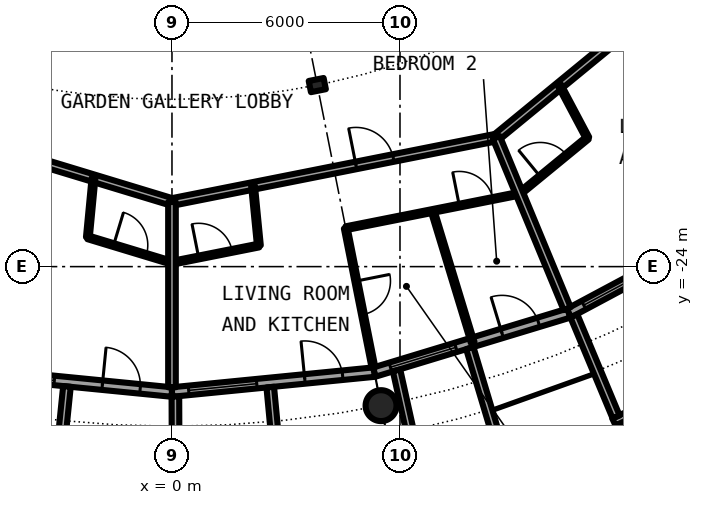
"""IFC4 building model, lengths in metres.
Left out: names, types, materials, properties, quantities, classifications, styles, units other than length and angle.
Written with IfcOpenShell. Run it as: python <this file> out.ifc"""

import sys

from ifc_helpers import new_model, si_unit, direction, frame, frame_2d, origin, origin_2d, place, context, subcontext, project, spatial, rectangle, circle, hollow_circle, i_section, extrude, element, fill, save


model = new_model("IFC4")
c1 = context("Model", 3, precision=1e-05, world=origin(), true_north=direction((0.0, 1.0)))
c2 = subcontext(c1, "Body", "Model", "MODEL_VIEW")
j1 = project(units=[si_unit("LENGTHUNIT", "METRE"), si_unit("PLANEANGLEUNIT", "RADIAN")], contexts=[c1])
p1 = place(None, origin())
s1 = spatial("IfcSite", under=j1, at=p1, CompositionType="ELEMENT")
p2 = place(p1, origin())
s2 = spatial("IfcBuilding", under=s1, at=p2, CompositionType="ELEMENT")
p3 = place(p2, frame((0.0, 0.0, 199.35)))
s3 = spatial("IfcBuildingStorey", under=s2, at=p3, CompositionType="ELEMENT", Elevation=199.35)
p4 = place(p3, frame((5.501, -27.658, 0.0), z_axis=(0.0, 0.0, 1.0), x_axis=(1.0, 0.0, 0.0)))
e1 = element("IfcColumn", 1, at=p4, inside=s3, PredefinedType="COLUMN", context=c2, shape_type="SweptSolid", body=[
    extrude(hollow_circle(Radius=0.406, WallThickness=0.03, at=origin_2d()), origin(), (0.0, 0.0, 1.0), 3.05),
])
p5 = place(p3, frame((3.824, -19.223, 0.0), z_axis=(0.0, 0.0, 1.0), x_axis=(0.195090322016, -0.980785280403, 0.0)))
e2 = element("IfcColumn", 2, at=p5, inside=s3, PredefinedType="COLUMN", context=c2, shape_type="SweptSolid", body=[
    extrude(i_section(OverallWidth=0.3, OverallDepth=0.4, WebThickness=0.013, FlangeThickness=0.024, FilletRadius=0.027, at=origin_2d()), origin(), (0.0, 0.0, 1.0), 3.05),
])
p6 = place(p3, frame((-5.326, -26.775, 0.0), z_axis=(0.0, 0.0, 1.0), x_axis=(0.995173996315, -0.098126026407, 0.0)))
e3 = element("IfcWall", 3, at=p6, inside=s3, PredefinedType="SOLIDWALL", context=c2, shape_type="SweptSolid", body=[
    extrude(rectangle(XDim=5.352, YDim=0.25, at=frame_2d((2.676, 0.0))), origin(), (0.0, 0.0, 1.0), 2.7),
])
p7 = place(p6, frame((0.441, 0.0, 0.3)))
e4 = element("IfcOpeningElement", 4, at=p7, cuts=e3, PredefinedType="OPENING", context=c2, shape_type="SweptSolid", body=[
    extrude(rectangle(XDim=1.8, YDim=2.1, at=frame_2d((0.9, 1.05))), frame((0.0, 0.135, 0.0), z_axis=(0.0, -1.0, 0.0), x_axis=(1.0, 0.0, 0.0)), (0.0, 0.0, 1.0), 0.27),
])
p8 = place(p6, frame((3.51, 0.0, 0.0)))
e5 = element("IfcOpeningElement", 5, at=p8, cuts=e3, PredefinedType="OPENING", context=c2, shape_type="SweptSolid", body=[
    extrude(rectangle(XDim=1.0, YDim=2.2, at=frame_2d((0.5, 1.1))), frame((0.0, 0.135, 0.0), z_axis=(0.0, -1.0, 0.0), x_axis=(1.0, 0.0, 0.0)), (0.0, 0.0, 1.0), 0.27),
])
p9 = place(p3, frame((-2.764, -27.153, -0.03), z_axis=(0.0, 0.0, 1.0), x_axis=(-0.101505487237, -0.994834979311, 0.0)))
e6 = element("IfcWall", 6, at=p9, inside=s3, PredefinedType="SOLIDWALL", context=c2, shape_type="SweptSolid", body=[
    extrude(rectangle(XDim=3.007, YDim=0.2, at=frame_2d((1.503, 0.0))), origin(), (0.0, 0.0, 1.0), 2.73),
])
p10 = place(p3, frame((0.0, -27.3, 0.0), z_axis=(0.0, 0.0, 1.0), x_axis=(0.995173996315, 0.098126026407, 0.0)))
e7 = element("IfcWall", 7, at=p10, inside=s3, PredefinedType="SOLIDWALL", context=c2, shape_type="SweptSolid", body=[
    extrude(rectangle(XDim=5.352, YDim=0.25, at=frame_2d((2.676, 0.0))), origin(), (0.0, 0.0, 1.0), 2.7),
])
p11 = place(p10, frame((0.441, 0.0, 0.3)))
e8 = element("IfcOpeningElement", 8, at=p11, cuts=e7, PredefinedType="OPENING", context=c2, shape_type="SweptSolid", body=[
    extrude(rectangle(XDim=1.8, YDim=2.1, at=frame_2d((0.9, 1.05))), frame((0.0, 0.135, 0.0), z_axis=(0.0, -1.0, 0.0), x_axis=(1.0, 0.0, 0.0)), (0.0, 0.0, 1.0), 0.27),
])
p12 = place(p10, frame((3.51, 0.0, 0.0)))
e9 = element("IfcOpeningElement", 9, at=p12, cuts=e7, PredefinedType="OPENING", context=c2, shape_type="SweptSolid", body=[
    extrude(rectangle(XDim=1.0, YDim=2.2, at=frame_2d((0.5, 1.1))), frame((0.0, 0.135, 0.0), z_axis=(0.0, -1.0, 0.0), x_axis=(1.0, 0.0, 0.0)), (0.0, 0.0, 1.0), 0.27),
])
p13 = place(p3, frame((0.09, -27.417, -0.03), z_axis=(0.0, 0.0, 1.0), x_axis=(0.00347308367, -0.999993968827, 0.0)))
e10 = element("IfcWall", 10, at=p13, inside=s3, PredefinedType="SOLIDWALL", context=c2, shape_type="SweptSolid", body=[
    extrude(rectangle(XDim=2.882, YDim=0.2, at=frame_2d((1.441, 0.0))), origin(), (0.0, 0.0, 1.0), 2.73),
])
p14 = place(p3, frame((2.586, -27.171, -0.03), z_axis=(0.0, 0.0, 1.0), x_axis=(0.094548432284, -0.995520262954, 0.0)))
e11 = element("IfcWall", 11, at=p14, inside=s3, PredefinedType="SOLIDWALL", context=c2, shape_type="SweptSolid", body=[
    extrude(rectangle(XDim=3.006, YDim=0.2, at=frame_2d((1.503, 0.0))), origin(), (0.0, 0.0, 1.0), 2.73),
])
p15 = place(p3, frame((5.326, -26.775, 0.0), z_axis=(0.0, 0.0, 1.0), x_axis=(0.956965678721, 0.290201119486, 0.0)))
e12 = element("IfcWall", 12, at=p15, inside=s3, PredefinedType="SOLIDWALL", context=c2, shape_type="SweptSolid", body=[
    extrude(rectangle(XDim=5.351, YDim=0.25, at=frame_2d((2.676, 0.0))), origin(), (0.0, 0.0, 1.0), 2.7),
])
p16 = place(p15, frame((0.441, 0.0, 0.3)))
e13 = element("IfcOpeningElement", 13, at=p16, cuts=e12, PredefinedType="OPENING", context=c2, shape_type="SweptSolid", body=[
    extrude(rectangle(XDim=1.8, YDim=2.1, at=frame_2d((0.9, 1.05))), frame((0.0, 0.135, 0.0), z_axis=(0.0, -1.0, 0.0), x_axis=(1.0, 0.0, 0.0)), (0.0, 0.0, 1.0), 0.27),
])
p17 = place(p15, frame((3.51, 0.0, 0.0)))
e14 = element("IfcOpeningElement", 14, at=p17, cuts=e12, PredefinedType="OPENING", context=c2, shape_type="SweptSolid", body=[
    extrude(rectangle(XDim=1.0, YDim=2.2, at=frame_2d((0.5, 1.1))), frame((0.0, 0.135, 0.0), z_axis=(0.0, -1.0, 0.0), x_axis=(1.0, 0.0, 0.0)), (0.0, 0.0, 1.0), 0.27),
])
p18 = place(p3, frame((5.909, -26.729, -0.03), z_axis=(0.0, 0.0, 1.0), x_axis=(0.216409053917, -0.976302781612, 0.0)))
e15 = element("IfcWall", 15, at=p18, inside=s3, PredefinedType="SOLIDWALL", context=c2, shape_type="SweptSolid", body=[
    extrude(rectangle(XDim=2.925, YDim=0.2, at=frame_2d((1.463, 0.0))), origin(), (0.0, 0.0, 1.0), 2.73),
])
p19 = place(p3, frame((7.837, -26.144, -0.03), z_axis=(0.0, 0.0, 1.0), x_axis=(0.287064767992, -0.957911174889, 0.0)))
e16 = element("IfcWall", 16, at=p19, inside=s3, PredefinedType="SOLIDWALL", context=c2, shape_type="SweptSolid", body=[
    extrude(rectangle(XDim=3.006, YDim=0.2, at=frame_2d((1.503, 0.0))), origin(), (0.0, 0.0, 1.0), 2.73),
])
p20 = place(p3, frame((10.447, -25.222, 0.0), z_axis=(0.0, 0.0, 1.0), x_axis=(0.881915646801, 0.471407246368, 0.0)))
e17 = element("IfcWall", 17, at=p20, inside=s3, PredefinedType="SOLIDWALL", context=c2, shape_type="SweptSolid", body=[
    extrude(rectangle(XDim=5.352, YDim=0.25, at=frame_2d((2.676, 0.0))), origin(), (0.0, 0.0, 1.0), 2.7),
])
p21 = place(p20, frame((0.441, 0.0, 0.3)))
e18 = element("IfcOpeningElement", 18, at=p21, cuts=e17, PredefinedType="OPENING", context=c2, shape_type="SweptSolid", body=[
    extrude(rectangle(XDim=1.8, YDim=2.1, at=frame_2d((0.9, 1.05))), frame((0.0, 0.135, 0.0), z_axis=(0.0, -1.0, 0.0), x_axis=(1.0, 0.0, 0.0)), (0.0, 0.0, 1.0), 0.27),
])
p22 = place(p20, frame((3.51, 0.0, 0.0)))
e19 = element("IfcOpeningElement", 19, at=p22, cuts=e17, PredefinedType="OPENING", context=c2, shape_type="SweptSolid", body=[
    extrude(rectangle(XDim=1.0, YDim=2.2, at=frame_2d((0.5, 1.1))), frame((0.0, 0.135, 0.0), z_axis=(0.0, -1.0, 0.0), x_axis=(1.0, 0.0, 0.0)), (0.0, 0.0, 1.0), 0.27),
])
p23 = place(p3, frame((11.629, -28.088, -0.03), z_axis=(0.0, 0.0, 1.0), x_axis=(0.904000060331, 0.427532327342, 0.0)))
e20 = element("IfcWall", 20, at=p23, inside=s3, PredefinedType="SOLIDWALL", context=c2, shape_type="SweptSolid", body=[
    extrude(rectangle(XDim=2.993, YDim=0.2, at=frame_2d((1.497, 0.0))), origin(), (0.0, 0.0, 1.0), 2.73),
])
p24 = place(p23, frame((0.457, 0.0, 0.33)))
e21 = element("IfcOpeningElement", 21, at=p24, cuts=e20, PredefinedType="OPENING", context=c2, shape_type="SweptSolid", body=[
    extrude(circle(Radius=1.04, at=frame_2d((1.04, 1.04))), frame((0.0, 0.11, 0.0), z_axis=(0.0, -1.0, 0.0), x_axis=(1.0, 0.0, 0.0)), (0.0, 0.0, 1.0), 0.22),
])
p25 = place(p3, frame((10.575, -25.295, -0.03), z_axis=(0.0, 0.0, 1.0), x_axis=(0.385697364644, -0.922625353492, 0.0)))
e22 = element("IfcWall", 22, at=p25, inside=s3, PredefinedType="SOLIDWALL", context=c2, shape_type="SweptSolid", body=[
    extrude(rectangle(XDim=2.883, YDim=0.2, at=frame_2d((1.442, 0.0))), origin(), (0.0, 0.0, 1.0), 2.73),
])
p26 = place(p3, frame((0.0, -23.9, 0.0), z_axis=(0.0, 0.0, 1.0), x_axis=(0.98079351414, 0.19504892366, 0.0)))
e23 = element("IfcWall", 23, at=p26, inside=s3, PredefinedType="PARTITIONING", context=c2, shape_type="SweptSolid", body=[
    extrude(rectangle(XDim=2.332, YDim=0.1, at=frame_2d((1.166, 0.0))), origin(), (0.0, 0.0, 1.0), 2.7),
])
p27 = place(p26, frame((0.716, 0.0, 0.0)))
e24 = element("IfcOpeningElement", 24, at=p27, cuts=e23, PredefinedType="OPENING", context=c2, shape_type="SweptSolid", body=[
    extrude(rectangle(XDim=0.9, YDim=2.3, at=frame_2d((0.45, 1.15))), frame((0.0, 0.06, 0.0), z_axis=(0.0, -1.0, 0.0), x_axis=(1.0, 0.0, 0.0)), (0.0, 0.0, 1.0), 0.12),
])
p28 = place(p3, frame((4.577, -22.989, 0.0), z_axis=(0.0, 0.0, 1.0), x_axis=(0.980813600024, 0.194947895622, 0.0)))
e25 = element("IfcWall", 25, at=p28, inside=s3, PredefinedType="PARTITIONING", context=c2, shape_type="SweptSolid", body=[
    extrude(rectangle(XDim=4.662, YDim=0.1, at=frame_2d((2.331, 0.0))), origin(), (0.0, 0.0, 1.0), 2.7),
])
p29 = place(p28, frame((3.043, 0.0, 0.0)))
e26 = element("IfcOpeningElement", 26, at=p29, cuts=e25, PredefinedType="OPENING", context=c2, shape_type="SweptSolid", body=[
    extrude(rectangle(XDim=0.9, YDim=2.3, at=frame_2d((0.45, 1.15))), frame((0.0, 0.06, 0.0), z_axis=(0.0, -1.0, 0.0), x_axis=(1.0, 0.0, 0.0)), (0.0, 0.0, 1.0), 0.12),
])
p30 = place(p3, frame((-2.213, -23.229, 0.0), z_axis=(0.0, 0.0, 1.0), x_axis=(0.957056340114, -0.289901986622, 0.0)))
e27 = element("IfcWall", 27, at=p30, inside=s3, PredefinedType="PARTITIONING", context=c2, shape_type="SweptSolid", body=[
    extrude(rectangle(XDim=2.314, YDim=0.1, at=frame_2d((1.157, 0.0))), origin(), (0.0, 0.0, 1.0), 2.7),
])
p31 = place(p30, frame((0.707, 0.0, 0.0)))
e28 = element("IfcOpeningElement", 28, at=p31, cuts=e27, PredefinedType="OPENING", context=c2, shape_type="SweptSolid", body=[
    extrude(rectangle(XDim=0.9, YDim=2.3, at=frame_2d((0.45, 1.15))), frame((0.0, 0.06, 0.0), z_axis=(0.0, -1.0, 0.0), x_axis=(1.0, 0.0, 0.0)), (0.0, 0.0, 1.0), 0.12),
])
p32 = place(p3, frame((9.146, -22.081, 0.0), z_axis=(0.0, 0.0, 1.0), x_axis=(0.773095932958, 0.634289112663, 0.0)))
e29 = element("IfcWall", 29, at=p32, inside=s3, PredefinedType="PARTITIONING", context=c2, shape_type="SweptSolid", body=[
    extrude(rectangle(XDim=2.313, YDim=0.1, at=frame_2d((1.156, 0.0))), origin(), (0.0, 0.0, 1.0), 2.7),
])
p33 = place(p32, frame((0.706, 0.0, 0.0)))
e30 = element("IfcOpeningElement", 30, at=p33, cuts=e29, PredefinedType="OPENING", context=c2, shape_type="SweptSolid", body=[
    extrude(rectangle(XDim=0.9, YDim=2.3, at=frame_2d((0.45, 1.15))), frame((0.0, 0.06, 0.0), z_axis=(0.0, -1.0, 0.0), x_axis=(1.0, 0.0, 0.0)), (0.0, 0.0, 1.0), 0.12),
])
p34 = place(p3, frame((0.0, -22.3, 0.0), z_axis=(0.0, 0.0, 1.0), x_axis=(0.980813117615, 0.194950322682, 0.0)))
e31 = element("IfcWall", 31, at=p34, inside=s3, PredefinedType="PARTITIONING", context=c2, shape_type="SweptSolid", body=[
    extrude(rectangle(XDim=8.7, YDim=0.2, at=frame_2d((4.35, 0.0))), origin(), (0.0, 0.0, 1.0), 2.7),
])
p35 = place(p34, frame((4.938, 0.0, 0.0)))
e32 = element("IfcOpeningElement", 32, at=p35, cuts=e31, PredefinedType="OPENING", context=c2, shape_type="SweptSolid", body=[
    extrude(rectangle(XDim=1.0, YDim=2.3, at=frame_2d((0.5, 1.15))), frame((0.0, 0.11, 0.0), z_axis=(0.0, -1.0, 0.0), x_axis=(1.0, 0.0, 0.0)), (0.0, 0.0, 1.0), 0.22),
])
p36 = place(p3, frame((-12.389, -18.542, 0.0), z_axis=(0.0, 0.0, 1.0), x_axis=(0.956942051091, -0.290279022415, 0.0)))
e33 = element("IfcWall", 33, at=p36, inside=s3, PredefinedType="PARTITIONING", context=c2, shape_type="SweptSolid", body=[
    extrude(rectangle(XDim=12.946, YDim=0.2, at=frame_2d((6.473, 0.0))), origin(), (0.0, 0.0, 1.0), 2.7),
])
p37 = place(p36, frame((4.895, 0.0, 0.0)))
e34 = element("IfcOpeningElement", 34, at=p37, cuts=e33, PredefinedType="OPENING", context=c2, shape_type="SweptSolid", body=[
    extrude(rectangle(XDim=1.0, YDim=2.3, at=frame_2d((0.5, 1.15))), frame((0.0, 0.11, 0.0), z_axis=(0.0, -1.0, 0.0), x_axis=(1.0, 0.0, 0.0)), (0.0, 0.0, 1.0), 0.22),
])
p38 = place(p3, frame((8.534, -20.603, 0.0), z_axis=(0.0, 0.0, 1.0), x_axis=(0.772983503654, 0.634426121056, 0.0)))
e35 = element("IfcWall", 35, at=p38, inside=s3, PredefinedType="PARTITIONING", context=c2, shape_type="SweptSolid", body=[
    extrude(rectangle(XDim=12.947, YDim=0.2, at=frame_2d((6.474, 0.0))), origin(), (0.0, 0.0, 1.0), 2.7),
])
p39 = place(p38, frame((7.053, 0.0, 0.0)))
e36 = element("IfcOpeningElement", 36, at=p39, cuts=e35, PredefinedType="OPENING", context=c2, shape_type="SweptSolid", body=[
    extrude(rectangle(XDim=1.0, YDim=2.3, at=frame_2d((0.5, 1.15))), frame((0.0, 0.11, 0.0), z_axis=(0.0, -1.0, 0.0), x_axis=(1.0, 0.0, 0.0)), (0.0, 0.0, 1.0), 0.22),
])
p40 = place(p3, frame((2.133, -21.876, 0.0), z_axis=(0.0, 0.0, 1.0), x_axis=(0.097709761212, -0.995214952944, 0.0)))
e37 = element("IfcWall", 37, at=p40, inside=s3, PredefinedType="PARTITIONING", context=c2, shape_type="SweptSolid", body=[
    extrude(rectangle(XDim=1.577, YDim=0.1, at=frame_2d((0.788, 0.0))), origin(), (0.0, 0.0, 1.0), 2.7),
])
p41 = place(p3, frame((-2.213, -23.229, 0.0), z_axis=(0.0, 0.0, 1.0), x_axis=(0.094720578196, 0.995503898569, 0.0)))
e38 = element("IfcWall", 38, at=p41, inside=s3, PredefinedType="PARTITIONING", context=c2, shape_type="SweptSolid", body=[
    extrude(rectangle(XDim=1.562, YDim=0.1, at=frame_2d((0.781, 0.0))), origin(), (0.0, 0.0, 1.0), 2.7),
])
p42 = place(p3, frame((0.0, -27.175, 0.0), z_axis=(0.0, 0.0, 1.0), x_axis=(0.0, 1.0, 0.0)))
e39 = element("IfcWall", 39, at=p42, inside=s3, PredefinedType="PARTITIONING", context=c2, shape_type="SweptSolid", body=[
    extrude(rectangle(XDim=4.875, YDim=0.2, at=frame_2d((2.438, 0.0))), origin(), (0.0, 0.0, 1.0), 2.7),
])
p43 = place(p3, frame((4.573, -22.99, 0.0), z_axis=(0.0, 0.0, 1.0), x_axis=(0.19518582438, -0.980766278968, 0.0)))
e40 = element("IfcWall", 40, at=p43, inside=s3, PredefinedType="PARTITIONING", context=c2, shape_type="SweptSolid", body=[
    extrude(rectangle(XDim=3.735, YDim=0.1, at=frame_2d((1.867, 0.0))), origin(), (0.0, 0.0, 1.0), 2.7),
])
p44 = place(p43, frame((1.417, 0.0, 0.0)))
e41 = element("IfcOpeningElement", 41, at=p44, cuts=e40, PredefinedType="OPENING", context=c2, shape_type="SweptSolid", body=[
    extrude(rectangle(XDim=0.9, YDim=2.3, at=frame_2d((0.45, 1.15))), frame((0.0, 0.06, 0.0), z_axis=(0.0, -1.0, 0.0), x_axis=(1.0, 0.0, 0.0)), (0.0, 0.0, 1.0), 0.12),
])
p45 = place(p3, frame((6.86, -22.536, 0.0), z_axis=(0.0, 0.0, 1.0), x_axis=(0.291054201552, -0.956706565128, 0.0)))
e42 = element("IfcWall", 42, at=p45, inside=s3, PredefinedType="PARTITIONING", context=c2, shape_type="SweptSolid", body=[
    extrude(rectangle(XDim=3.618, YDim=0.1, at=frame_2d((1.809, 0.0))), origin(), (0.0, 0.0, 1.0), 2.7),
])
p46 = place(p3, frame((8.534, -20.603, 0.0), z_axis=(0.0, 0.0, 1.0), x_axis=(0.382651153718, -0.923892902104, 0.0)))
e43 = element("IfcWall", 43, at=p46, inside=s3, PredefinedType="PARTITIONING", context=c2, shape_type="SweptSolid", body=[
    extrude(rectangle(XDim=4.874, YDim=0.2, at=frame_2d((2.437, 0.0))), origin(), (0.0, 0.0, 1.0), 2.7),
])
p47 = place(p3, frame((10.202, -19.234, 0.0), z_axis=(0.0, 0.0, 1.0), x_axis=(0.468648615763, -0.88338466986, 0.0)))
e44 = element("IfcWall", 44, at=p47, inside=s3, PredefinedType="PARTITIONING", context=c2, shape_type="SweptSolid", body=[
    extrude(rectangle(XDim=1.562, YDim=0.1, at=frame_2d((0.781, 0.0))), origin(), (0.0, 0.0, 1.0), 2.7),
])
p48 = place(p7, origin())
e45 = element("IfcWindow", 45, at=p48, inside=s3, PartitioningType="SINGLE_PANEL", PredefinedType="WINDOW", context=c2, shape_type="SweptSolid", body=[
    extrude(rectangle(XDim=1.8, YDim=2.1, at=frame_2d((0.9, 1.05))), frame((0.0, 0.03, 0.0), z_axis=(0.0, -1.0, 0.0), x_axis=(1.0, 0.0, 0.0)), (0.0, 0.0, 1.0), 0.06),
])
fill(e4, e45)
p49 = place(p8, origin())
e46 = element("IfcDoor", 46, at=p49, inside=s3, OperationType="SINGLE_SWING_LEFT", PredefinedType="DOOR", context=c2, shape_type="SweptSolid", body=[
    extrude(rectangle(XDim=1.0, YDim=2.2, at=frame_2d((0.5, 1.1))), frame((0.0, 0.025, 0.0), z_axis=(0.0, -1.0, 0.0), x_axis=(1.0, 0.0, 0.0)), (0.0, 0.0, 1.0), 0.05),
])
fill(e5, e46)
p50 = place(p11, origin())
e47 = element("IfcWindow", 47, at=p50, inside=s3, PartitioningType="SINGLE_PANEL", PredefinedType="WINDOW", context=c2, shape_type="SweptSolid", body=[
    extrude(rectangle(XDim=1.8, YDim=2.1, at=frame_2d((0.9, 1.05))), frame((0.0, 0.03, 0.0), z_axis=(0.0, -1.0, 0.0), x_axis=(1.0, 0.0, 0.0)), (0.0, 0.0, 1.0), 0.06),
])
fill(e8, e47)
p51 = place(p12, origin())
e48 = element("IfcDoor", 48, at=p51, inside=s3, OperationType="SINGLE_SWING_LEFT", PredefinedType="DOOR", context=c2, shape_type="SweptSolid", body=[
    extrude(rectangle(XDim=1.0, YDim=2.2, at=frame_2d((0.5, 1.1))), frame((0.0, 0.025, 0.0), z_axis=(0.0, -1.0, 0.0), x_axis=(1.0, 0.0, 0.0)), (0.0, 0.0, 1.0), 0.05),
])
fill(e9, e48)
p52 = place(p16, origin())
e49 = element("IfcWindow", 49, at=p52, inside=s3, PartitioningType="SINGLE_PANEL", PredefinedType="WINDOW", context=c2, shape_type="SweptSolid", body=[
    extrude(rectangle(XDim=1.8, YDim=2.1, at=frame_2d((0.9, 1.05))), frame((0.0, 0.03, 0.0), z_axis=(0.0, -1.0, 0.0), x_axis=(1.0, 0.0, 0.0)), (0.0, 0.0, 1.0), 0.06),
])
fill(e13, e49)
p53 = place(p17, origin())
e50 = element("IfcDoor", 50, at=p53, inside=s3, OperationType="SINGLE_SWING_LEFT", PredefinedType="DOOR", context=c2, shape_type="SweptSolid", body=[
    extrude(rectangle(XDim=1.0, YDim=2.2, at=frame_2d((0.5, 1.1))), frame((0.0, 0.025, 0.0), z_axis=(0.0, -1.0, 0.0), x_axis=(1.0, 0.0, 0.0)), (0.0, 0.0, 1.0), 0.05),
])
fill(e14, e50)
p54 = place(p21, origin())
e51 = element("IfcWindow", 51, at=p54, inside=s3, PartitioningType="SINGLE_PANEL", PredefinedType="WINDOW", context=c2, shape_type="SweptSolid", body=[
    extrude(rectangle(XDim=1.8, YDim=2.1, at=frame_2d((0.9, 1.05))), frame((0.0, 0.03, 0.0), z_axis=(0.0, -1.0, 0.0), x_axis=(1.0, 0.0, 0.0)), (0.0, 0.0, 1.0), 0.06),
])
fill(e18, e51)
p55 = place(p31, origin())
e52 = element("IfcDoor", 52, at=p55, inside=s3, OperationType="SINGLE_SWING_LEFT", PredefinedType="DOOR", context=c2, shape_type="SweptSolid", body=[
    extrude(rectangle(XDim=0.9, YDim=2.3, at=frame_2d((0.45, 1.15))), frame((0.0, 0.025, 0.0), z_axis=(0.0, -1.0, 0.0), x_axis=(1.0, 0.0, 0.0)), (0.0, 0.0, 1.0), 0.05),
])
fill(e28, e52)
p56 = place(p35, origin())
e53 = element("IfcDoor", 53, at=p56, inside=s3, OperationType="SINGLE_SWING_RIGHT", PredefinedType="DOOR", context=c2, shape_type="SweptSolid", body=[
    extrude(rectangle(XDim=1.0, YDim=2.3, at=frame_2d((0.5, 1.15))), frame((0.0, 0.025, 0.0), z_axis=(0.0, -1.0, 0.0), x_axis=(1.0, 0.0, 0.0)), (0.0, 0.0, 1.0), 0.05),
])
fill(e32, e53)
p57 = place(p27, origin())
e54 = element("IfcDoor", 54, at=p57, inside=s3, OperationType="SINGLE_SWING_LEFT", PredefinedType="DOOR", context=c2, shape_type="SweptSolid", body=[
    extrude(rectangle(XDim=0.9, YDim=2.3, at=frame_2d((0.45, 1.15))), frame((0.0, 0.025, 0.0), z_axis=(0.0, -1.0, 0.0), x_axis=(1.0, 0.0, 0.0)), (0.0, 0.0, 1.0), 0.05),
])
fill(e24, e54)
p58 = place(p44, origin())
e55 = element("IfcDoor", 55, at=p58, inside=s3, OperationType="SINGLE_SWING_LEFT", PredefinedType="DOOR", context=c2, shape_type="SweptSolid", body=[
    extrude(rectangle(XDim=0.9, YDim=2.3, at=frame_2d((0.45, 1.15))), frame((0.0, 0.025, 0.0), z_axis=(0.0, -1.0, 0.0), x_axis=(1.0, 0.0, 0.0)), (0.0, 0.0, 1.0), 0.05),
])
fill(e41, e55)
p59 = place(p29, origin())
e56 = element("IfcDoor", 56, at=p59, inside=s3, OperationType="SINGLE_SWING_RIGHT", PredefinedType="DOOR", context=c2, shape_type="SweptSolid", body=[
    extrude(rectangle(XDim=0.9, YDim=2.3, at=frame_2d((0.45, 1.15))), frame((0.0, 0.025, 0.0), z_axis=(0.0, -1.0, 0.0), x_axis=(1.0, 0.0, 0.0)), (0.0, 0.0, 1.0), 0.05),
])
fill(e26, e56)
p60 = place(p33, origin())
e57 = element("IfcDoor", 57, at=p60, inside=s3, OperationType="SINGLE_SWING_LEFT", PredefinedType="DOOR", context=c2, shape_type="SweptSolid", body=[
    extrude(rectangle(XDim=0.9, YDim=2.3, at=frame_2d((0.45, 1.15))), frame((0.0, 0.025, 0.0), z_axis=(0.0, -1.0, 0.0), x_axis=(1.0, 0.0, 0.0)), (0.0, 0.0, 1.0), 0.05),
])
fill(e30, e57)
save(model, sys.argv[1])
